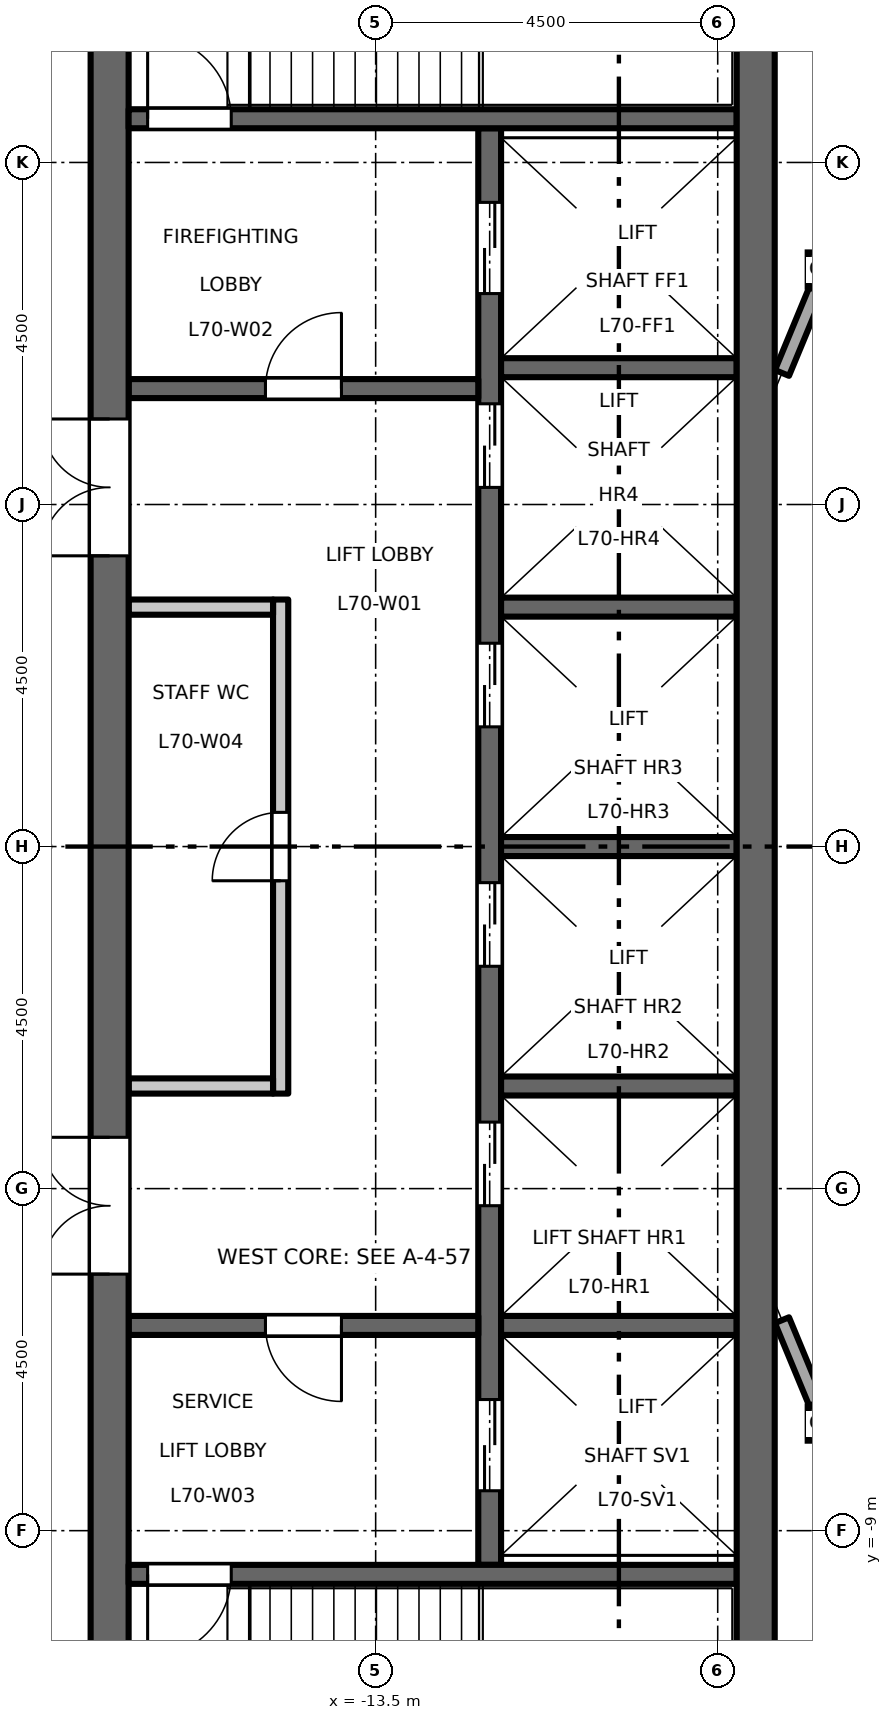
"""IFC4 building model, lengths in metres.
Left out: names, types, materials, properties, quantities, classifications, styles, units other than length and angle.
Written with IfcOpenShell. Run it as: python <this file> out.ifc"""

import sys

from ifc_helpers import new_model, si_unit, direction, frame, frame_2d, origin, origin_2d, place, context, subcontext, project, spatial, rectangle, hollow_rectangle, extrude, element, fill, save


model = new_model("IFC4")
c1 = context("Model", 3, precision=1e-05, world=origin(), true_north=direction((0.0, 1.0)))
c2 = subcontext(c1, "Body", "Model", "MODEL_VIEW")
j1 = project(units=[si_unit("LENGTHUNIT", "METRE"), si_unit("PLANEANGLEUNIT", "RADIAN")], contexts=[c1])
p1 = place(None, origin())
s1 = spatial("IfcSite", under=j1, at=p1, CompositionType="ELEMENT")
p2 = place(p1, origin())
s2 = spatial("IfcBuilding", under=s1, at=p2, CompositionType="ELEMENT")
p3 = place(p2, frame((0.0, 0.0, 325.7)))
s3 = spatial("IfcBuildingStorey", under=s2, at=p3, CompositionType="ELEMENT", Elevation=325.7)
for number, where, z_axis, x_axis in (
    (1, (-7.591, -7.591, 0.0), (0.0, 0.0, 1.0), (1.0, 0.0, 0.0)),
    (2, (-7.591, 7.591, 0.0), (0.0, 0.0, 1.0), (1.0, 0.0, 0.0)),
):
    element("IfcColumn", number, at=place(p3, frame(where, z_axis=z_axis, x_axis=x_axis)), inside=s3, PredefinedType="COLUMN", context=c2, shape_type="SweptSolid", body=[
        extrude(hollow_rectangle(XDim=0.45, YDim=0.45, WallThickness=0.022, at=origin_2d()), origin(), (0.0, 0.0, 1.0), 4.5),
    ])
p4 = place(p3, frame((-14.75, -3.25, 0.0), z_axis=(0.0, 0.0, 1.0), x_axis=(0.0, 1.0, 0.0)))
e3 = element("IfcWall", 3, at=p4, inside=s3, PredefinedType="PARTITIONING", context=c2, shape_type="SweptSolid", body=[
    extrude(rectangle(XDim=6.5, YDim=0.2, at=frame_2d((3.25, 0.0))), origin(), (0.0, 0.0, 1.0), 4.35),
])
p5 = place(p4, frame((2.8, 0.0, 0.0)))
e4 = element("IfcOpeningElement", 4, at=p5, cuts=e3, PredefinedType="OPENING", context=c2, shape_type="SweptSolid", body=[
    extrude(rectangle(XDim=0.9, YDim=2.1, at=frame_2d((0.45, 1.05))), frame((0.0, 0.11, 0.0), z_axis=(0.0, -1.0, 0.0), x_axis=(1.0, 0.0, 0.0)), (0.0, 0.0, 1.0), 0.22),
])
for number, where, z_axis, x_axis in (
    (5, (-14.85, 3.15, 0.0), (0.0, 0.0, 1.0), (-1.0, 0.0, 0.0)),
    (6, (-14.85, -3.15, 0.0), (0.0, 0.0, 1.0), (-1.0, 0.0, 0.0)),
):
    element("IfcWall", number, at=place(p3, frame(where, z_axis=z_axis, x_axis=x_axis)), inside=s3, PredefinedType="PARTITIONING", context=c2, shape_type="SweptSolid", body=[
        extrude(rectangle(XDim=1.9, YDim=0.2, at=frame_2d((0.95, 0.0))), origin(), (0.0, 0.0, 1.0), 4.35),
    ])
p6 = place(p3, frame((-12.0, -9.45, 0.0), z_axis=(0.0, 0.0, 1.0), x_axis=(0.0, 1.0, 0.0)))
e7 = element("IfcWall", 7, at=p6, inside=s3, PredefinedType="SHEAR", context=c2, shape_type="SweptSolid", body=[
    extrude(rectangle(XDim=18.9, YDim=0.3, at=frame_2d((9.45, 0.0))), origin(), (0.0, 0.0, 1.0), 4.35),
])
p7 = place(p6, frame((4.725, 0.0, 0.0)))
e8 = element("IfcOpeningElement", 8, at=p7, cuts=e7, PredefinedType="OPENING", context=c2, shape_type="SweptSolid", body=[
    extrude(rectangle(XDim=1.1, YDim=2.1, at=frame_2d((0.55, 1.05))), frame((0.0, 0.16, 0.0), z_axis=(0.0, -1.0, 0.0), x_axis=(1.0, 0.0, 0.0)), (0.0, 0.0, 1.0), 0.32),
])
p8 = place(p6, frame((7.875, 0.0, 0.0)))
e9 = element("IfcOpeningElement", 9, at=p8, cuts=e7, PredefinedType="OPENING", context=c2, shape_type="SweptSolid", body=[
    extrude(rectangle(XDim=1.1, YDim=2.1, at=frame_2d((0.55, 1.05))), frame((0.0, 0.16, 0.0), z_axis=(0.0, -1.0, 0.0), x_axis=(1.0, 0.0, 0.0)), (0.0, 0.0, 1.0), 0.32),
])
p9 = place(p6, frame((11.025, 0.0, 0.0)))
e10 = element("IfcOpeningElement", 10, at=p9, cuts=e7, PredefinedType="OPENING", context=c2, shape_type="SweptSolid", body=[
    extrude(rectangle(XDim=1.1, YDim=2.1, at=frame_2d((0.55, 1.05))), frame((0.0, 0.16, 0.0), z_axis=(0.0, -1.0, 0.0), x_axis=(1.0, 0.0, 0.0)), (0.0, 0.0, 1.0), 0.32),
])
p10 = place(p6, frame((14.175, 0.0, 0.0)))
e11 = element("IfcOpeningElement", 11, at=p10, cuts=e7, PredefinedType="OPENING", context=c2, shape_type="SweptSolid", body=[
    extrude(rectangle(XDim=1.1, YDim=2.1, at=frame_2d((0.55, 1.05))), frame((0.0, 0.16, 0.0), z_axis=(0.0, -1.0, 0.0), x_axis=(1.0, 0.0, 0.0)), (0.0, 0.0, 1.0), 0.32),
])
p11 = place(p6, frame((16.725, 0.0, 0.0)))
e12 = element("IfcOpeningElement", 12, at=p11, cuts=e7, PredefinedType="OPENING", context=c2, shape_type="SweptSolid", body=[
    extrude(rectangle(XDim=1.2, YDim=2.1, at=frame_2d((0.6, 1.05))), frame((0.0, 0.16, 0.0), z_axis=(0.0, -1.0, 0.0), x_axis=(1.0, 0.0, 0.0)), (0.0, 0.0, 1.0), 0.32),
])
p12 = place(p6, frame((0.975, 0.0, 0.0)))
e13 = element("IfcOpeningElement", 13, at=p12, cuts=e7, PredefinedType="OPENING", context=c2, shape_type="SweptSolid", body=[
    extrude(rectangle(XDim=1.2, YDim=2.1, at=frame_2d((0.6, 1.05))), frame((0.0, 0.16, 0.0), z_axis=(0.0, -1.0, 0.0), x_axis=(1.0, 0.0, 0.0)), (0.0, 0.0, 1.0), 0.32),
])
p13 = place(p3, frame((-12.15, 6.025, 0.0), z_axis=(0.0, 0.0, 1.0), x_axis=(-1.0, 0.0, 0.0)))
e14 = element("IfcWall", 14, at=p13, inside=s3, PredefinedType="SHEAR", context=c2, shape_type="SweptSolid", body=[
    extrude(rectangle(XDim=4.6, YDim=0.25, at=frame_2d((2.3, 0.0))), origin(), (0.0, 0.0, 1.0), 4.35),
])
p14 = place(p13, frame((1.8, 0.0, 0.0)))
e15 = element("IfcOpeningElement", 15, at=p14, cuts=e14, PredefinedType="OPENING", context=c2, shape_type="SweptSolid", body=[
    extrude(rectangle(XDim=1.0, YDim=2.1, at=frame_2d((0.5, 1.05))), frame((0.0, 0.135, 0.0), z_axis=(0.0, -1.0, 0.0), x_axis=(1.0, 0.0, 0.0)), (0.0, 0.0, 1.0), 0.27),
])
p15 = place(p3, frame((-12.15, -6.3, 0.0), z_axis=(0.0, 0.0, 1.0), x_axis=(-1.0, 0.0, 0.0)))
e16 = element("IfcWall", 16, at=p15, inside=s3, PredefinedType="SHEAR", context=c2, shape_type="SweptSolid", body=[
    extrude(rectangle(XDim=4.6, YDim=0.25, at=frame_2d((2.3, 0.0))), origin(), (0.0, 0.0, 1.0), 4.35),
])
p16 = place(p15, frame((1.8, 0.0, 0.0)))
e17 = element("IfcOpeningElement", 17, at=p16, cuts=e16, PredefinedType="OPENING", context=c2, shape_type="SweptSolid", body=[
    extrude(rectangle(XDim=1.0, YDim=2.1, at=frame_2d((0.5, 1.05))), frame((0.0, 0.135, 0.0), z_axis=(0.0, -1.0, 0.0), x_axis=(1.0, 0.0, 0.0)), (0.0, 0.0, 1.0), 0.27),
])
p17 = place(p3, frame((-17.0, -13.0, 0.0), z_axis=(0.0, 0.0, 1.0), x_axis=(0.0, 1.0, 0.0)))
e18 = element("IfcWall", 18, at=p17, inside=s3, PredefinedType="SHEAR", context=c2, shape_type="SweptSolid", body=[
    extrude(rectangle(XDim=26.0, YDim=0.5, at=frame_2d((13.0, 0.0))), origin(), (0.0, 0.0, 1.0), 4.35),
])
p18 = place(p17, frame((16.825, 0.0, 0.0)))
e19 = element("IfcOpeningElement", 19, at=p18, cuts=e18, PredefinedType="OPENING", context=c2, shape_type="SweptSolid", body=[
    extrude(rectangle(XDim=1.8, YDim=2.1, at=frame_2d((0.9, 1.05))), frame((0.0, 0.26, 0.0), z_axis=(0.0, -1.0, 0.0), x_axis=(1.0, 0.0, 0.0)), (0.0, 0.0, 1.0), 0.52),
])
p19 = place(p17, frame((7.375, 0.0, 0.0)))
e20 = element("IfcOpeningElement", 20, at=p19, cuts=e18, PredefinedType="OPENING", context=c2, shape_type="SweptSolid", body=[
    extrude(rectangle(XDim=1.8, YDim=2.1, at=frame_2d((0.9, 1.05))), frame((0.0, 0.26, 0.0), z_axis=(0.0, -1.0, 0.0), x_axis=(1.0, 0.0, 0.0)), (0.0, 0.0, 1.0), 0.52),
])
for number, where, z_axis, x_axis in (
    (21, (-8.75, 0.0, 0.0), (0.0, 0.0, 1.0), (-1.0, 0.0, 0.0)),
    (22, (-8.75, 3.15, 0.0), (0.0, 0.0, 1.0), (-1.0, 0.0, 0.0)),
    (23, (-8.75, 6.3, 0.0), (0.0, 0.0, 1.0), (-1.0, 0.0, 0.0)),
    (24, (-8.75, -3.15, 0.0), (0.0, 0.0, 1.0), (-1.0, 0.0, 0.0)),
    (25, (-8.75, -6.3, 0.0), (0.0, 0.0, 1.0), (-1.0, 0.0, 0.0)),
):
    element("IfcWall", number, at=place(p3, frame(where, z_axis=z_axis, x_axis=x_axis)), inside=s3, PredefinedType="SHEAR", context=c2, shape_type="SweptSolid", body=[
        extrude(rectangle(XDim=3.1, YDim=0.25, at=frame_2d((1.55, 0.0))), origin(), (0.0, 0.0, 1.0), 4.35),
    ])
p20 = place(p3, frame((-8.75, 9.575, 0.0), z_axis=(0.0, 0.0, 1.0), x_axis=(-1.0, 0.0, 0.0)))
e26 = element("IfcWall", 26, at=p20, inside=s3, PredefinedType="SHEAR", context=c2, shape_type="SweptSolid", body=[
    extrude(rectangle(XDim=8.0, YDim=0.25, at=frame_2d((4.0, 0.0))), origin(), (0.0, 0.0, 1.0), 4.35),
])
p21 = place(p20, frame((6.65, 0.0, 0.0)))
e27 = element("IfcOpeningElement", 27, at=p21, cuts=e26, PredefinedType="OPENING", context=c2, shape_type="SweptSolid", body=[
    extrude(rectangle(XDim=1.1, YDim=2.1, at=frame_2d((0.55, 1.05))), frame((0.0, 0.135, 0.0), z_axis=(0.0, -1.0, 0.0), x_axis=(1.0, 0.0, 0.0)), (0.0, 0.0, 1.0), 0.27),
])
p22 = place(p3, frame((-8.75, -9.575, 0.0), z_axis=(0.0, 0.0, 1.0), x_axis=(-1.0, 0.0, 0.0)))
e28 = element("IfcWall", 28, at=p22, inside=s3, PredefinedType="SHEAR", context=c2, shape_type="SweptSolid", body=[
    extrude(rectangle(XDim=8.0, YDim=0.25, at=frame_2d((4.0, 0.0))), origin(), (0.0, 0.0, 1.0), 4.35),
])
p23 = place(p22, frame((6.65, 0.0, 0.0)))
e29 = element("IfcOpeningElement", 29, at=p23, cuts=e28, PredefinedType="OPENING", context=c2, shape_type="SweptSolid", body=[
    extrude(rectangle(XDim=1.1, YDim=2.1, at=frame_2d((0.55, 1.05))), frame((0.0, 0.135, 0.0), z_axis=(0.0, -1.0, 0.0), x_axis=(1.0, 0.0, 0.0)), (0.0, 0.0, 1.0), 0.27),
])
p24 = place(p3, frame((-8.5, -13.0, 0.0), z_axis=(0.0, 0.0, 1.0), x_axis=(0.0, 1.0, 0.0)))
e30 = element("IfcWall", 30, at=p24, inside=s3, PredefinedType="SHEAR", context=c2, shape_type="SweptSolid", body=[
    extrude(rectangle(XDim=26.0, YDim=0.5, at=frame_2d((13.0, 0.0))), origin(), (0.0, 0.0, 1.0), 4.35),
])
for number, where, z_axis, x_axis in (
    (31, (-7.703, 7.319, 0.0), (0.0, 0.0, 1.0), (-0.383, -0.924, 0.0)),
    (32, (-8.154, -6.231, 0.0), (0.0, 0.0, 1.0), (0.383, -0.924, 0.0)),
):
    element("IfcWall", number, at=place(p3, frame(where, z_axis=z_axis, x_axis=x_axis)), inside=s3, PredefinedType="STANDARD", context=c2, shape_type="SweptSolid", body=[
        extrude(rectangle(XDim=1.178, YDim=0.2, at=frame_2d((0.589, 0.0))), origin(), (0.0, 0.0, 1.0), 4.01),
    ])
p25 = place(p14, origin())
e33 = element("IfcDoor", 33, at=p25, inside=s3, OperationType="SINGLE_SWING_LEFT", PredefinedType="DOOR", context=c2, shape_type="SweptSolid", body=[
    extrude(rectangle(XDim=1.0, YDim=2.1, at=frame_2d((0.5, 1.05))), frame((0.0, 0.025, 0.0), z_axis=(0.0, -1.0, 0.0), x_axis=(1.0, 0.0, 0.0)), (0.0, 0.0, 1.0), 0.05),
])
fill(e15, e33)
p26 = place(p16, origin())
e34 = element("IfcDoor", 34, at=p26, inside=s3, OperationType="SINGLE_SWING_RIGHT", PredefinedType="DOOR", context=c2, shape_type="SweptSolid", body=[
    extrude(rectangle(XDim=1.0, YDim=2.1, at=frame_2d((0.5, 1.05))), frame((0.0, 0.025, 0.0), z_axis=(0.0, -1.0, 0.0), x_axis=(1.0, 0.0, 0.0)), (0.0, 0.0, 1.0), 0.05),
])
fill(e17, e34)
p27 = place(p21, origin())
e35 = element("IfcDoor", 35, at=p27, inside=s3, OperationType="SINGLE_SWING_RIGHT", PredefinedType="DOOR", context=c2, shape_type="SweptSolid", body=[
    extrude(rectangle(XDim=1.1, YDim=2.1, at=frame_2d((0.55, 1.05))), frame((0.0, 0.025, 0.0), z_axis=(0.0, -1.0, 0.0), x_axis=(1.0, 0.0, 0.0)), (0.0, 0.0, 1.0), 0.05),
])
fill(e27, e35)
p28 = place(p23, origin())
e36 = element("IfcDoor", 36, at=p28, inside=s3, OperationType="SINGLE_SWING_LEFT", PredefinedType="DOOR", context=c2, shape_type="SweptSolid", body=[
    extrude(rectangle(XDim=1.1, YDim=2.1, at=frame_2d((0.55, 1.05))), frame((0.0, 0.025, 0.0), z_axis=(0.0, -1.0, 0.0), x_axis=(1.0, 0.0, 0.0)), (0.0, 0.0, 1.0), 0.05),
])
fill(e29, e36)
p29 = place(p18, origin())
e37 = element("IfcDoor", 37, at=p29, inside=s3, OperationType="DOUBLE_DOOR_DOUBLE_SWING", PredefinedType="DOOR", context=c2, shape_type="SweptSolid", body=[
    extrude(rectangle(XDim=1.8, YDim=2.1, at=frame_2d((0.9, 1.05))), frame((0.0, 0.025, 0.0), z_axis=(0.0, -1.0, 0.0), x_axis=(1.0, 0.0, 0.0)), (0.0, 0.0, 1.0), 0.05),
])
fill(e19, e37)
p30 = place(p19, origin())
e38 = element("IfcDoor", 38, at=p30, inside=s3, OperationType="DOUBLE_DOOR_DOUBLE_SWING", PredefinedType="DOOR", context=c2, shape_type="SweptSolid", body=[
    extrude(rectangle(XDim=1.8, YDim=2.1, at=frame_2d((0.9, 1.05))), frame((0.0, 0.025, 0.0), z_axis=(0.0, -1.0, 0.0), x_axis=(1.0, 0.0, 0.0)), (0.0, 0.0, 1.0), 0.05),
])
fill(e20, e38)
p31 = place(p7, origin())
e39 = element("IfcDoor", 39, at=p31, inside=s3, OperationType="DOUBLE_DOOR_SLIDING", PredefinedType="DOOR", context=c2, shape_type="SweptSolid", body=[
    extrude(rectangle(XDim=1.1, YDim=2.1, at=frame_2d((0.55, 1.05))), frame((0.0, 0.025, 0.0), z_axis=(0.0, -1.0, 0.0), x_axis=(1.0, 0.0, 0.0)), (0.0, 0.0, 1.0), 0.05),
])
fill(e8, e39)
p32 = place(p8, origin())
e40 = element("IfcDoor", 40, at=p32, inside=s3, OperationType="DOUBLE_DOOR_SLIDING", PredefinedType="DOOR", context=c2, shape_type="SweptSolid", body=[
    extrude(rectangle(XDim=1.1, YDim=2.1, at=frame_2d((0.55, 1.05))), frame((0.0, 0.025, 0.0), z_axis=(0.0, -1.0, 0.0), x_axis=(1.0, 0.0, 0.0)), (0.0, 0.0, 1.0), 0.05),
])
fill(e9, e40)
p33 = place(p9, origin())
e41 = element("IfcDoor", 41, at=p33, inside=s3, OperationType="DOUBLE_DOOR_SLIDING", PredefinedType="DOOR", context=c2, shape_type="SweptSolid", body=[
    extrude(rectangle(XDim=1.1, YDim=2.1, at=frame_2d((0.55, 1.05))), frame((0.0, 0.025, 0.0), z_axis=(0.0, -1.0, 0.0), x_axis=(1.0, 0.0, 0.0)), (0.0, 0.0, 1.0), 0.05),
])
fill(e10, e41)
p34 = place(p10, origin())
e42 = element("IfcDoor", 42, at=p34, inside=s3, OperationType="DOUBLE_DOOR_SLIDING", PredefinedType="DOOR", context=c2, shape_type="SweptSolid", body=[
    extrude(rectangle(XDim=1.1, YDim=2.1, at=frame_2d((0.55, 1.05))), frame((0.0, 0.025, 0.0), z_axis=(0.0, -1.0, 0.0), x_axis=(1.0, 0.0, 0.0)), (0.0, 0.0, 1.0), 0.05),
])
fill(e11, e42)
p35 = place(p11, origin())
e43 = element("IfcDoor", 43, at=p35, inside=s3, OperationType="DOUBLE_DOOR_SLIDING", PredefinedType="DOOR", context=c2, shape_type="SweptSolid", body=[
    extrude(rectangle(XDim=1.2, YDim=2.1, at=frame_2d((0.6, 1.05))), frame((0.0, 0.025, 0.0), z_axis=(0.0, -1.0, 0.0), x_axis=(1.0, 0.0, 0.0)), (0.0, 0.0, 1.0), 0.05),
])
fill(e12, e43)
p36 = place(p12, origin())
e44 = element("IfcDoor", 44, at=p36, inside=s3, OperationType="DOUBLE_DOOR_SLIDING", PredefinedType="DOOR", context=c2, shape_type="SweptSolid", body=[
    extrude(rectangle(XDim=1.2, YDim=2.1, at=frame_2d((0.6, 1.05))), frame((0.0, 0.025, 0.0), z_axis=(0.0, -1.0, 0.0), x_axis=(1.0, 0.0, 0.0)), (0.0, 0.0, 1.0), 0.05),
])
fill(e13, e44)
p37 = place(p5, origin())
e45 = element("IfcDoor", 45, at=p37, inside=s3, OperationType="SINGLE_SWING_RIGHT", PredefinedType="DOOR", context=c2, shape_type="SweptSolid", body=[
    extrude(rectangle(XDim=0.9, YDim=2.1, at=frame_2d((0.45, 1.05))), frame((0.0, 0.025, 0.0), z_axis=(0.0, -1.0, 0.0), x_axis=(1.0, 0.0, 0.0)), (0.0, 0.0, 1.0), 0.05),
])
fill(e4, e45)
save(model, sys.argv[1])
